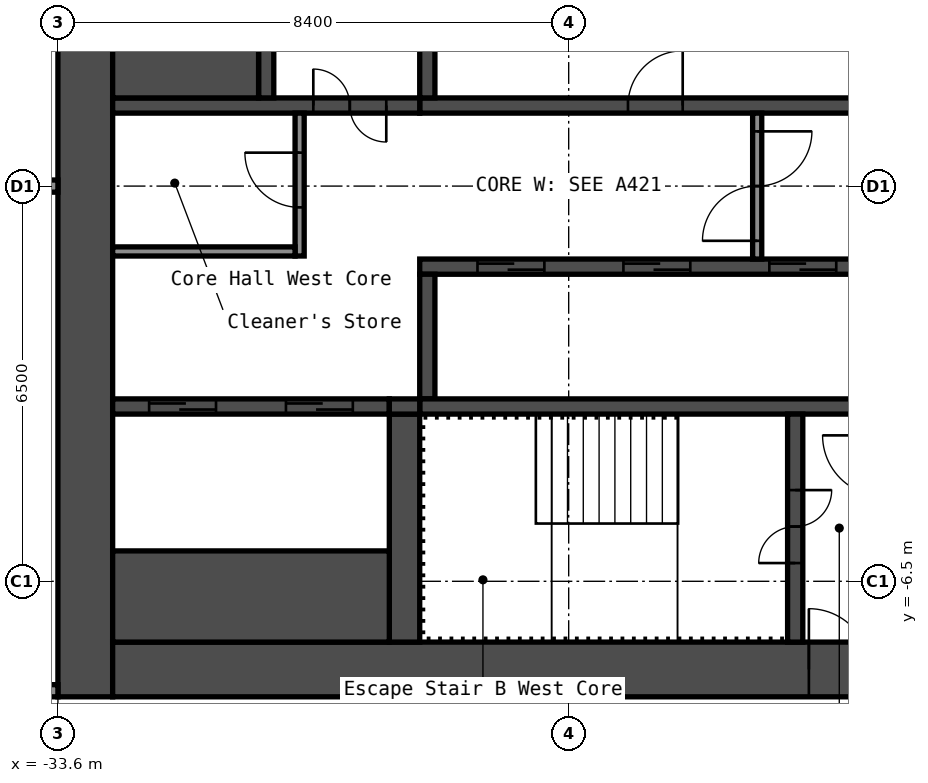
"""IFC4 building model, lengths in metres.
Left out: names, types, materials, properties, quantities, classifications, styles, units other than length and angle.
Written with IfcOpenShell. Run it as: python <this file> out.ifc"""

import sys

from ifc_helpers import new_model, si_unit, direction, frame, frame_2d, origin, place, context, subcontext, project, spatial, rectangle, extrude, element, fill, save


model = new_model("IFC4")
c1 = context("Model", 3, precision=1e-05, world=origin(), true_north=direction((0.0, 1.0)))
c2 = subcontext(c1, "Body", "Model", "MODEL_VIEW")
j1 = project(units=[si_unit("LENGTHUNIT", "METRE"), si_unit("PLANEANGLEUNIT", "RADIAN")], contexts=[c1])
p1 = place(None, origin())
s1 = spatial("IfcSite", under=j1, at=p1, CompositionType="ELEMENT")
p2 = place(p1, origin())
s2 = spatial("IfcBuilding", under=s1, at=p2, CompositionType="ELEMENT")
p3 = place(p2, frame((0.0, 0.0, 140.6)))
s3 = spatial("IfcBuildingStorey", under=s2, at=p3, CompositionType="ELEMENT", Elevation=140.6)
p4 = place(p3, frame((-33.15, -8.4, 0.0), z_axis=(0.0, 0.0, 1.0), x_axis=(0.0, 1.0, 0.0)))
e1 = element("IfcWall", 1, at=p4, inside=s3, PredefinedType="SHEAR", context=c2, shape_type="SweptSolid", body=[
    extrude(rectangle(XDim=16.8, YDim=0.9, at=frame_2d((8.4, 0.0))), origin(), (0.0, 0.0, 1.0), 2.75),
])
p5 = place(p3, frame((-32.7, -7.95, 0.0), z_axis=(0.0, 0.0, 1.0), x_axis=(1.0, 0.0, 0.0)))
e2 = element("IfcWall", 2, at=p5, inside=s3, PredefinedType="SHEAR", context=c2, shape_type="SweptSolid", body=[
    extrude(rectangle(XDim=15.0, YDim=0.9, at=frame_2d((7.5, 0.0))), origin(), (0.0, 0.0, 1.0), 2.75),
])
p6 = place(p5, frame((11.45, 0.0, 0.0)))
e3 = element("IfcOpeningElement", 3, at=p6, cuts=e2, PredefinedType="OPENING", context=c2, shape_type="SweptSolid", body=[
    extrude(rectangle(XDim=1.0, YDim=2.1, at=frame_2d((0.5, 1.05))), frame((0.0, 0.46, 0.0), z_axis=(0.0, -1.0, 0.0), x_axis=(1.0, 0.0, 0.0)), (0.0, 0.0, 1.0), 0.92),
])
p7 = place(p3, frame((-27.65, 1.325, 0.0), z_axis=(0.0, 0.0, 1.0), x_axis=(1.0, 0.0, 0.0)))
e4 = element("IfcWall", 4, at=p7, inside=s3, PredefinedType="SHEAR", context=c2, shape_type="SweptSolid", body=[
    extrude(rectangle(XDim=7.5, YDim=0.25, at=frame_2d((3.75, 0.0))), origin(), (0.0, 0.0, 1.0), 2.75),
])
p8 = place(p7, frame((3.425, 0.0, 0.0)))
e5 = element("IfcOpeningElement", 5, at=p8, cuts=e4, PredefinedType="OPENING", context=c2, shape_type="SweptSolid", body=[
    extrude(rectangle(XDim=0.9, YDim=2.1, at=frame_2d((0.45, 1.05))), frame((0.0, 0.135, 0.0), z_axis=(0.0, -1.0, 0.0), x_axis=(1.0, 0.0, 0.0)), (0.0, 0.0, 1.0), 0.27),
])
p9 = place(p3, frame((-27.525, 1.45, 0.0), z_axis=(0.0, 0.0, 1.0), x_axis=(0.0, 1.0, 0.0)))
e6 = element("IfcWall", 6, at=p9, inside=s3, PredefinedType="SHEAR", context=c2, shape_type="SweptSolid", body=[
    extrude(rectangle(XDim=2.05, YDim=0.25, at=frame_2d((1.025, 0.0))), origin(), (0.0, 0.0, 1.0), 2.75),
])
p10 = place(p3, frame((-32.7, 1.325, 0.0), z_axis=(0.0, 0.0, 1.0), x_axis=(1.0, 0.0, 0.0)))
e7 = element("IfcWall", 7, at=p10, inside=s3, PredefinedType="SHEAR", context=c2, shape_type="SweptSolid", body=[
    extrude(rectangle(XDim=5.05, YDim=0.25, at=frame_2d((2.525, 0.0))), origin(), (0.0, 0.0, 1.0), 2.75),
])
p11 = place(p10, frame((3.3, 0.0, 0.0)))
e8 = element("IfcOpeningElement", 8, at=p11, cuts=e7, PredefinedType="OPENING", context=c2, shape_type="SweptSolid", body=[
    extrude(rectangle(XDim=1.2, YDim=2.1, at=frame_2d((0.6, 1.05))), frame((0.0, 0.135, 0.0), z_axis=(0.0, -1.0, 0.0), x_axis=(1.0, 0.0, 0.0)), (0.0, 0.0, 1.0), 0.27),
])
p12 = place(p3, frame((-30.175, 1.45, 0.0), z_axis=(0.0, 0.0, 1.0), x_axis=(0.0, 1.0, 0.0)))
e9 = element("IfcWall", 9, at=p12, inside=s3, PredefinedType="SHEAR", context=c2, shape_type="SweptSolid", body=[
    extrude(rectangle(XDim=6.05, YDim=0.25, at=frame_2d((3.025, 0.0))), origin(), (0.0, 0.0, 1.0), 2.75),
])
p13 = place(p12, frame((2.625, 0.0, 0.0)))
e10 = element("IfcOpeningElement", 10, at=p13, cuts=e9, PredefinedType="OPENING", context=c2, shape_type="SweptSolid", body=[
    extrude(rectangle(XDim=1.1, YDim=2.1, at=frame_2d((0.55, 1.05))), frame((0.0, 0.135, 0.0), z_axis=(0.0, -1.0, 0.0), x_axis=(1.0, 0.0, 0.0)), (0.0, 0.0, 1.0), 0.27),
])
p14 = place(p3, frame((-32.7, 2.375, 0.0), z_axis=(0.0, 0.0, 1.0), x_axis=(1.0, 0.0, 0.0)))
e11 = element("IfcWall", 11, at=p14, inside=s3, PredefinedType="SHEAR", context=c2, shape_type="SweptSolid", body=[
    extrude(rectangle(XDim=2.4, YDim=1.85, at=frame_2d((1.2, 0.0))), origin(), (0.0, 0.0, 1.0), 2.75),
])
p15 = place(p3, frame((-27.65, -1.325, 0.0), z_axis=(0.0, 0.0, 1.0), x_axis=(1.0, 0.0, 0.0)))
e12 = element("IfcWall", 12, at=p15, inside=s3, PredefinedType="SHEAR", context=c2, shape_type="SweptSolid", body=[
    extrude(rectangle(XDim=7.5, YDim=0.25, at=frame_2d((3.75, 0.0))), origin(), (0.0, 0.0, 1.0), 2.75),
])
p16 = place(p15, frame((5.75, 0.0, 0.0)))
e13 = element("IfcOpeningElement", 13, at=p16, cuts=e12, PredefinedType="OPENING", context=c2, shape_type="SweptSolid", body=[
    extrude(rectangle(XDim=1.1, YDim=2.1, at=frame_2d((0.55, 1.05))), frame((0.0, 0.135, 0.0), z_axis=(0.0, -1.0, 0.0), x_axis=(1.0, 0.0, 0.0)), (0.0, 0.0, 1.0), 0.27),
])
p17 = place(p15, frame((3.35, 0.0, 0.0)))
e14 = element("IfcOpeningElement", 14, at=p17, cuts=e12, PredefinedType="OPENING", context=c2, shape_type="SweptSolid", body=[
    extrude(rectangle(XDim=1.1, YDim=2.1, at=frame_2d((0.55, 1.05))), frame((0.0, 0.135, 0.0), z_axis=(0.0, -1.0, 0.0), x_axis=(1.0, 0.0, 0.0)), (0.0, 0.0, 1.0), 0.27),
])
p18 = place(p15, frame((0.95, 0.0, 0.0)))
e15 = element("IfcOpeningElement", 15, at=p18, cuts=e12, PredefinedType="OPENING", context=c2, shape_type="SweptSolid", body=[
    extrude(rectangle(XDim=1.1, YDim=2.1, at=frame_2d((0.55, 1.05))), frame((0.0, 0.135, 0.0), z_axis=(0.0, -1.0, 0.0), x_axis=(1.0, 0.0, 0.0)), (0.0, 0.0, 1.0), 0.27),
])
p19 = place(p3, frame((-27.525, -3.5, 0.0), z_axis=(0.0, 0.0, 1.0), x_axis=(0.0, 1.0, 0.0)))
e16 = element("IfcWall", 16, at=p19, inside=s3, PredefinedType="SHEAR", context=c2, shape_type="SweptSolid", body=[
    extrude(rectangle(XDim=2.05, YDim=0.25, at=frame_2d((1.025, 0.0))), origin(), (0.0, 0.0, 1.0), 2.75),
])
p20 = place(p3, frame((-27.65, -3.625, 0.0), z_axis=(0.0, 0.0, 1.0), x_axis=(1.0, 0.0, 0.0)))
e17 = element("IfcWall", 17, at=p20, inside=s3, PredefinedType="SHEAR", context=c2, shape_type="SweptSolid", body=[
    extrude(rectangle(XDim=7.5, YDim=0.25, at=frame_2d((3.75, 0.0))), origin(), (0.0, 0.0, 1.0), 2.75),
])
p21 = place(p3, frame((-21.475, -7.5, 0.0), z_axis=(0.0, 0.0, 1.0), x_axis=(0.0, 1.0, 0.0)))
e18 = element("IfcWall", 18, at=p21, inside=s3, PredefinedType="SHEAR", context=c2, shape_type="SweptSolid", body=[
    extrude(rectangle(XDim=3.75, YDim=0.25, at=frame_2d((1.875, 0.0))), origin(), (0.0, 0.0, 1.0), 2.75),
])
p22 = place(p21, frame((1.3, 0.0, 0.0)))
e19 = element("IfcOpeningElement", 19, at=p22, cuts=e18, PredefinedType="OPENING", context=c2, shape_type="SweptSolid", body=[
    extrude(rectangle(XDim=1.2, YDim=2.1, at=frame_2d((0.6, 1.05))), frame((0.0, 0.135, 0.0), z_axis=(0.0, -1.0, 0.0), x_axis=(1.0, 0.0, 0.0)), (0.0, 0.0, 1.0), 0.27),
])
p23 = place(p3, frame((-27.9, -7.5, 0.0), z_axis=(0.0, 0.0, 1.0), x_axis=(0.0, 1.0, 0.0)))
e20 = element("IfcWall", 20, at=p23, inside=s3, PredefinedType="SHEAR", context=c2, shape_type="SweptSolid", body=[
    extrude(rectangle(XDim=3.75, YDim=0.5, at=frame_2d((1.875, 0.0))), origin(), (0.0, 0.0, 1.0), 2.75),
])
p24 = place(p3, frame((-32.7, -3.625, 0.0), z_axis=(0.0, 0.0, 1.0), x_axis=(1.0, 0.0, 0.0)))
e21 = element("IfcWall", 21, at=p24, inside=s3, PredefinedType="SHEAR", context=c2, shape_type="SweptSolid", body=[
    extrude(rectangle(XDim=4.55, YDim=0.25, at=frame_2d((2.275, 0.0))), origin(), (0.0, 0.0, 1.0), 2.75),
])
p25 = place(p24, frame((2.85, 0.0, 0.0)))
e22 = element("IfcOpeningElement", 22, at=p25, cuts=e21, PredefinedType="OPENING", context=c2, shape_type="SweptSolid", body=[
    extrude(rectangle(XDim=1.1, YDim=2.1, at=frame_2d((0.55, 1.05))), frame((0.0, 0.135, 0.0), z_axis=(0.0, -1.0, 0.0), x_axis=(1.0, 0.0, 0.0)), (0.0, 0.0, 1.0), 0.27),
])
p26 = place(p24, frame((0.6, 0.0, 0.0)))
e23 = element("IfcOpeningElement", 23, at=p26, cuts=e21, PredefinedType="OPENING", context=c2, shape_type="SweptSolid", body=[
    extrude(rectangle(XDim=1.1, YDim=2.1, at=frame_2d((0.55, 1.05))), frame((0.0, 0.135, 0.0), z_axis=(0.0, -1.0, 0.0), x_axis=(1.0, 0.0, 0.0)), (0.0, 0.0, 1.0), 0.27),
])
p27 = place(p3, frame((-32.7, -6.75, 0.0), z_axis=(0.0, 0.0, 1.0), x_axis=(1.0, 0.0, 0.0)))
e24 = element("IfcWall", 24, at=p27, inside=s3, PredefinedType="SHEAR", context=c2, shape_type="SweptSolid", body=[
    extrude(rectangle(XDim=4.55, YDim=1.5, at=frame_2d((2.275, 0.0))), origin(), (0.0, 0.0, 1.0), 2.75),
])
p28 = place(p3, frame((-28.15, -3.625, 0.0), z_axis=(0.0, 0.0, 1.0), x_axis=(1.0, 0.0, 0.0)))
e25 = element("IfcWall", 25, at=p28, inside=s3, PredefinedType="SHEAR", context=c2, shape_type="SweptSolid", body=[
    extrude(rectangle(XDim=0.5, YDim=0.25, at=frame_2d((0.25, 0.0))), origin(), (0.0, 0.0, 1.0), 2.75),
])
p29 = place(p3, frame((-22.1, -1.2, 0.0), z_axis=(0.0, 0.0, 1.0), x_axis=(0.0, 1.0, 0.0)))
e26 = element("IfcWall", 26, at=p29, inside=s3, PredefinedType="PARTITIONING", context=c2, shape_type="SweptSolid", body=[
    extrude(rectangle(XDim=2.4, YDim=0.15, at=frame_2d((1.2, 0.0))), origin(), (0.0, 0.0, 1.0), 2.75),
])
p30 = place(p29, frame((0.3, 0.0, 0.0)))
e27 = element("IfcOpeningElement", 27, at=p30, cuts=e26, PredefinedType="OPENING", context=c2, shape_type="SweptSolid", body=[
    extrude(rectangle(XDim=1.8, YDim=2.1, at=frame_2d((0.9, 1.05))), frame((0.0, 0.085, 0.0), z_axis=(0.0, -1.0, 0.0), x_axis=(1.0, 0.0, 0.0)), (0.0, 0.0, 1.0), 0.17),
])
p31 = place(p3, frame((-29.625, -1.15, 0.0), z_axis=(0.0, 0.0, 1.0), x_axis=(0.0, 1.0, 0.0)))
e28 = element("IfcWall", 28, at=p31, inside=s3, PredefinedType="PARTITIONING", context=c2, shape_type="SweptSolid", body=[
    extrude(rectangle(XDim=2.35, YDim=0.15, at=frame_2d((1.175, 0.0))), origin(), (0.0, 0.0, 1.0), 2.75),
])
p32 = place(p31, frame((0.8, 0.0, 0.0)))
e29 = element("IfcOpeningElement", 29, at=p32, cuts=e28, PredefinedType="OPENING", context=c2, shape_type="SweptSolid", body=[
    extrude(rectangle(XDim=0.9, YDim=2.1, at=frame_2d((0.45, 1.05))), frame((0.0, 0.085, 0.0), z_axis=(0.0, -1.0, 0.0), x_axis=(1.0, 0.0, 0.0)), (0.0, 0.0, 1.0), 0.17),
])
p33 = place(p3, frame((-32.7, -1.075, 0.0), z_axis=(0.0, 0.0, 1.0), x_axis=(1.0, 0.0, 0.0)))
e30 = element("IfcWall", 30, at=p33, inside=s3, PredefinedType="PARTITIONING", context=c2, shape_type="SweptSolid", body=[
    extrude(rectangle(XDim=3.0, YDim=0.15, at=frame_2d((1.5, 0.0))), origin(), (0.0, 0.0, 1.0), 2.75),
])
p34 = place(p3, frame((-40.2, -8.3, 0.0), z_axis=(0.0, 0.0, 1.0), x_axis=(1.0, 0.0, 0.0)))
e31 = element("IfcWall", 31, at=p34, inside=s3, PredefinedType="PARTITIONING", context=c2, shape_type="SweptSolid", body=[
    extrude(rectangle(XDim=6.6, YDim=0.2, at=frame_2d((3.3, 0.0))), origin(), (0.0, 0.0, 1.0), 2.75),
])
p35 = place(p34, frame((1.595, 0.0, 0.0)))
e32 = element("IfcOpeningElement", 32, at=p35, cuts=e31, PredefinedType="OPENING", context=c2, shape_type="SweptSolid", body=[
    extrude(rectangle(XDim=0.9, YDim=2.1, at=frame_2d((0.45, 1.05))), frame((0.0, 0.11, 0.0), z_axis=(0.0, -1.0, 0.0), x_axis=(1.0, 0.0, 0.0)), (0.0, 0.0, 1.0), 0.22),
])
p36 = place(p34, frame((4.895, 0.0, 0.0)))
e33 = element("IfcOpeningElement", 33, at=p36, cuts=e31, PredefinedType="OPENING", context=c2, shape_type="SweptSolid", body=[
    extrude(rectangle(XDim=0.9, YDim=2.1, at=frame_2d((0.45, 1.05))), frame((0.0, 0.11, 0.0), z_axis=(0.0, -1.0, 0.0), x_axis=(1.0, 0.0, 0.0)), (0.0, 0.0, 1.0), 0.22),
])
p37 = place(p3, frame((-40.1, 0.0, 0.0), z_axis=(0.0, 0.0, 1.0), x_axis=(1.0, 0.0, 0.0)))
e34 = element("IfcWall", 34, at=p37, inside=s3, PredefinedType="PARTITIONING", context=c2, shape_type="SweptSolid", body=[
    extrude(rectangle(XDim=6.5, YDim=0.2, at=frame_2d((3.25, 0.0))), origin(), (0.0, 0.0, 1.0), 2.75),
])
p38 = place(p6, origin())
e35 = element("IfcDoor", 35, at=p38, inside=s3, OperationType="SINGLE_SWING_RIGHT", PredefinedType="DOOR", context=c2, shape_type="SweptSolid", body=[
    extrude(rectangle(XDim=1.0, YDim=2.1, at=frame_2d((0.5, 1.05))), frame((0.0, 0.025, 0.0), z_axis=(0.0, -1.0, 0.0), x_axis=(1.0, 0.0, 0.0)), (0.0, 0.0, 1.0), 0.05),
])
fill(e3, e35)
p39 = place(p22, origin())
e36 = element("IfcDoor", 36, at=p39, inside=s3, OperationType="DOUBLE_DOOR_SINGLE_SWING", PredefinedType="DOOR", context=c2, shape_type="SweptSolid", body=[
    extrude(rectangle(XDim=1.2, YDim=2.1, at=frame_2d((0.6, 1.05))), frame((0.0, 0.025, 0.0), z_axis=(0.0, -1.0, 0.0), x_axis=(1.0, 0.0, 0.0)), (0.0, 0.0, 1.0), 0.05),
])
fill(e19, e36)
p40 = place(p11, origin())
e37 = element("IfcDoor", 37, at=p40, inside=s3, OperationType="DOUBLE_DOOR_SINGLE_SWING", PredefinedType="DOOR", context=c2, shape_type="SweptSolid", body=[
    extrude(rectangle(XDim=1.2, YDim=2.1, at=frame_2d((0.6, 1.05))), frame((0.0, 0.025, 0.0), z_axis=(0.0, -1.0, 0.0), x_axis=(1.0, 0.0, 0.0)), (0.0, 0.0, 1.0), 0.05),
])
fill(e8, e37)
p41 = place(p30, origin())
e38 = element("IfcDoor", 38, at=p41, inside=s3, OperationType="DOUBLE_DOOR_SINGLE_SWING", PredefinedType="DOOR", context=c2, shape_type="SweptSolid", body=[
    extrude(rectangle(XDim=1.8, YDim=2.1, at=frame_2d((0.9, 1.05))), frame((0.0, 0.025, 0.0), z_axis=(0.0, -1.0, 0.0), x_axis=(1.0, 0.0, 0.0)), (0.0, 0.0, 1.0), 0.05),
])
fill(e27, e38)
p42 = place(p32, origin())
e39 = element("IfcDoor", 39, at=p42, inside=s3, OperationType="SINGLE_SWING_LEFT", PredefinedType="DOOR", context=c2, shape_type="SweptSolid", body=[
    extrude(rectangle(XDim=0.9, YDim=2.1, at=frame_2d((0.45, 1.05))), frame((0.0, 0.025, 0.0), z_axis=(0.0, -1.0, 0.0), x_axis=(1.0, 0.0, 0.0)), (0.0, 0.0, 1.0), 0.05),
])
fill(e29, e39)
p43 = place(p8, origin())
e40 = element("IfcDoor", 40, at=p43, inside=s3, OperationType="SINGLE_SWING_LEFT", PredefinedType="DOOR", context=c2, shape_type="SweptSolid", body=[
    extrude(rectangle(XDim=0.9, YDim=2.1, at=frame_2d((0.45, 1.05))), frame((0.0, 0.025, 0.0), z_axis=(0.0, -1.0, 0.0), x_axis=(1.0, 0.0, 0.0)), (0.0, 0.0, 1.0), 0.05),
])
fill(e5, e40)
p44 = place(p16, origin())
e41 = element("IfcDoor", 41, at=p44, inside=s3, OperationType="DOUBLE_DOOR_SLIDING", PredefinedType="DOOR", context=c2, shape_type="SweptSolid", body=[
    extrude(rectangle(XDim=1.1, YDim=2.1, at=frame_2d((0.55, 1.05))), frame((0.0, 0.025, 0.0), z_axis=(0.0, -1.0, 0.0), x_axis=(1.0, 0.0, 0.0)), (0.0, 0.0, 1.0), 0.05),
])
fill(e13, e41)
p45 = place(p17, origin())
e42 = element("IfcDoor", 42, at=p45, inside=s3, OperationType="DOUBLE_DOOR_SLIDING", PredefinedType="DOOR", context=c2, shape_type="SweptSolid", body=[
    extrude(rectangle(XDim=1.1, YDim=2.1, at=frame_2d((0.55, 1.05))), frame((0.0, 0.025, 0.0), z_axis=(0.0, -1.0, 0.0), x_axis=(1.0, 0.0, 0.0)), (0.0, 0.0, 1.0), 0.05),
])
fill(e14, e42)
p46 = place(p18, origin())
e43 = element("IfcDoor", 43, at=p46, inside=s3, OperationType="DOUBLE_DOOR_SLIDING", PredefinedType="DOOR", context=c2, shape_type="SweptSolid", body=[
    extrude(rectangle(XDim=1.1, YDim=2.1, at=frame_2d((0.55, 1.05))), frame((0.0, 0.025, 0.0), z_axis=(0.0, -1.0, 0.0), x_axis=(1.0, 0.0, 0.0)), (0.0, 0.0, 1.0), 0.05),
])
fill(e15, e43)
p47 = place(p25, origin())
e44 = element("IfcDoor", 44, at=p47, inside=s3, OperationType="DOUBLE_DOOR_SLIDING", PredefinedType="DOOR", context=c2, shape_type="SweptSolid", body=[
    extrude(rectangle(XDim=1.1, YDim=2.1, at=frame_2d((0.55, 1.05))), frame((0.0, 0.025, 0.0), z_axis=(0.0, -1.0, 0.0), x_axis=(1.0, 0.0, 0.0)), (0.0, 0.0, 1.0), 0.05),
])
fill(e22, e44)
p48 = place(p26, origin())
e45 = element("IfcDoor", 45, at=p48, inside=s3, OperationType="DOUBLE_DOOR_SLIDING", PredefinedType="DOOR", context=c2, shape_type="SweptSolid", body=[
    extrude(rectangle(XDim=1.1, YDim=2.1, at=frame_2d((0.55, 1.05))), frame((0.0, 0.025, 0.0), z_axis=(0.0, -1.0, 0.0), x_axis=(1.0, 0.0, 0.0)), (0.0, 0.0, 1.0), 0.05),
])
fill(e23, e45)
save(model, sys.argv[1])
